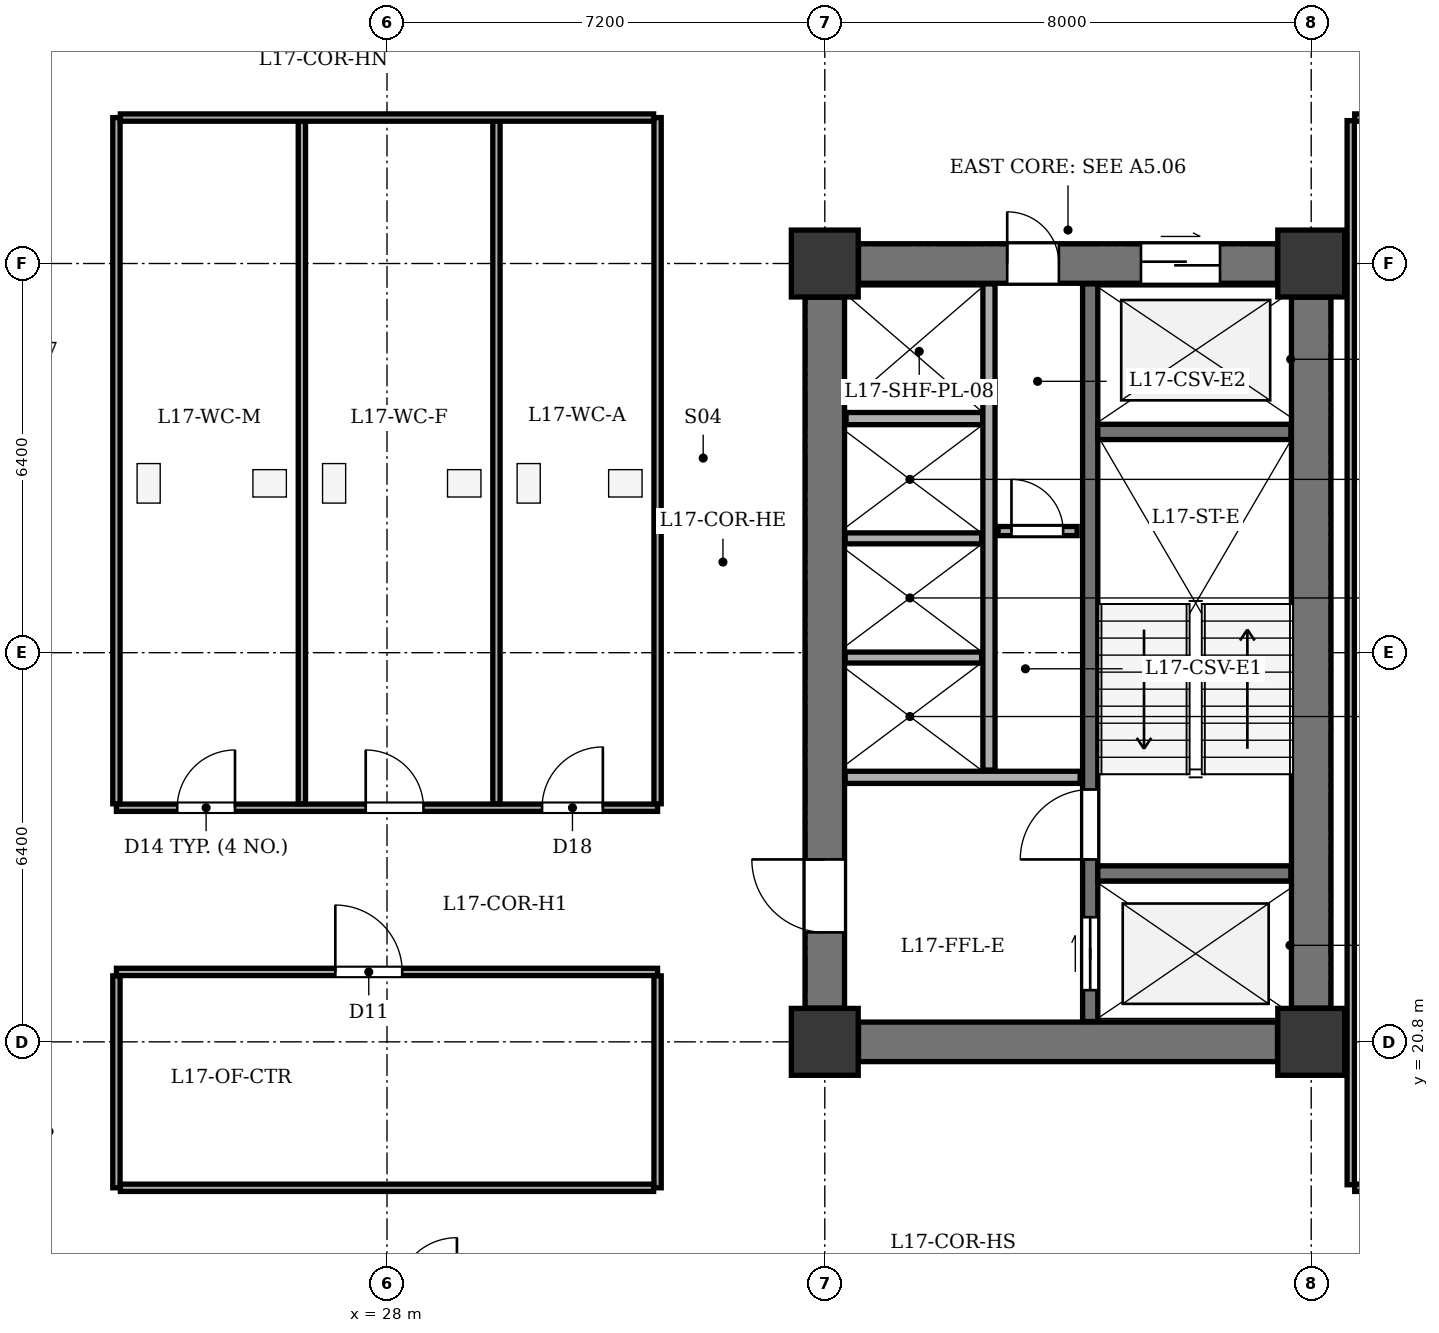
"""IFC4 building model, lengths in metres.
Left out: names, types, materials, properties, quantities, classifications, styles, units other than length and angle.
Written with IfcOpenShell. Run it as: python <this file> out.ifc"""

import sys

from ifc_helpers import new_model, si_unit, direction, frame, frame_2d, origin, origin_2d, place, context, subcontext, project, spatial, rectangle, extrude, element, fill, save


model = new_model("IFC4")
c1 = context("Model", 3, precision=1e-05, world=origin(), true_north=direction((0.0, 1.0)))
c2 = subcontext(c1, "Body", "Model", "MODEL_VIEW")
j1 = project(units=[si_unit("LENGTHUNIT", "METRE"), si_unit("PLANEANGLEUNIT", "RADIAN")], contexts=[c1])
p1 = place(None, origin())
s1 = spatial("IfcSite", under=j1, at=p1, CompositionType="ELEMENT")
p2 = place(p1, origin())
s2 = spatial("IfcBuilding", under=s1, at=p2, CompositionType="ELEMENT")
p3 = place(p2, frame((0.0, 0.0, 71.1)))
s3 = spatial("IfcBuildingStorey", under=s2, at=p3, CompositionType="ELEMENT", Elevation=71.1)
for number, where, z_axis, x_axis in (
    (1, (35.2, 20.8, 0.0), (0.0, 0.0, 1.0), (1.0, 0.0, 0.0)),
    (2, (43.2, 20.8, 0.0), (0.0, 0.0, 1.0), (1.0, 0.0, 0.0)),
    (3, (35.2, 33.6, 0.0), (0.0, 0.0, 1.0), (1.0, 0.0, 0.0)),
    (4, (43.2, 33.6, 0.0), (0.0, 0.0, 1.0), (1.0, 0.0, 0.0)),
):
    element("IfcColumn", number, at=place(p3, frame(where, z_axis=z_axis, x_axis=x_axis)), inside=s3, PredefinedType="COLUMN", context=c2, shape_type="SweptSolid", body=[
        extrude(rectangle(XDim=1.1, YDim=1.1, at=origin_2d()), origin(), (0.0, 0.0, 1.0), 3.9),
    ])
p4 = place(p3, frame((43.2, 21.355, 0.0), z_axis=(0.0, 0.0, 1.0), x_axis=(0.0, 1.0, 0.0)))
e5 = element("IfcWall", 5, at=p4, inside=s3, PredefinedType="SHEAR", context=c2, shape_type="SweptSolid", body=[
    extrude(rectangle(XDim=11.69, YDim=0.65, at=frame_2d((5.845, 0.0))), origin(), (0.0, 0.0, 1.0), 3.6),
])
p5 = place(p3, frame((35.755, 20.8, 0.0), z_axis=(0.0, 0.0, 1.0), x_axis=(1.0, 0.0, 0.0)))
e6 = element("IfcWall", 6, at=p5, inside=s3, PredefinedType="SHEAR", context=c2, shape_type="SweptSolid", body=[
    extrude(rectangle(XDim=6.89, YDim=0.65, at=frame_2d((3.445, 0.0))), origin(), (0.0, 0.0, 1.0), 3.6),
])
p6 = place(p3, frame((35.755, 33.6, 0.0), z_axis=(0.0, 0.0, 1.0), x_axis=(1.0, 0.0, 0.0)))
e7 = element("IfcWall", 7, at=p6, inside=s3, PredefinedType="SHEAR", context=c2, shape_type="SweptSolid", body=[
    extrude(rectangle(XDim=6.89, YDim=0.65, at=frame_2d((3.445, 0.0))), origin(), (0.0, 0.0, 1.0), 3.6),
])
p7 = place(p6, frame((4.645, 0.0, 0.0)))
e8 = element("IfcOpeningElement", 8, at=p7, cuts=e7, PredefinedType="OPENING", context=c2, shape_type="SweptSolid", body=[
    extrude(rectangle(XDim=1.3, YDim=2.15, at=frame_2d((0.65, 1.075))), frame((0.0, 0.335, 0.0), z_axis=(0.0, -1.0, 0.0), x_axis=(1.0, 0.0, 0.0)), (0.0, 0.0, 1.0), 0.67),
])
p8 = place(p6, frame((2.445, 0.0, 0.0)))
e9 = element("IfcOpeningElement", 9, at=p8, cuts=e7, PredefinedType="OPENING", context=c2, shape_type="SweptSolid", body=[
    extrude(rectangle(XDim=0.85, YDim=2.02, at=frame_2d((0.425, 1.01))), frame((0.0, 0.335, 0.0), z_axis=(0.0, -1.0, 0.0), x_axis=(1.0, 0.0, 0.0)), (0.0, 0.0, 1.0), 0.67),
])
p9 = place(p3, frame((35.2, 21.355, 0.0), z_axis=(0.0, 0.0, 1.0), x_axis=(0.0, 1.0, 0.0)))
e10 = element("IfcWall", 10, at=p9, inside=s3, PredefinedType="SHEAR", context=c2, shape_type="SweptSolid", body=[
    extrude(rectangle(XDim=11.69, YDim=0.65, at=frame_2d((5.845, 0.0))), origin(), (0.0, 0.0, 1.0), 3.6),
])
p10 = place(p9, frame((1.245, 0.0, 0.0)))
e11 = element("IfcOpeningElement", 11, at=p10, cuts=e10, PredefinedType="OPENING", context=c2, shape_type="SweptSolid", body=[
    extrude(rectangle(XDim=1.2, YDim=2.15, at=frame_2d((0.6, 1.075))), frame((0.0, 0.335, 0.0), z_axis=(0.0, -1.0, 0.0), x_axis=(1.0, 0.0, 0.0)), (0.0, 0.0, 1.0), 0.67),
])
p11 = place(p3, frame((39.565, 21.135, 0.0), z_axis=(0.0, 0.0, 1.0), x_axis=(0.0, 1.0, 0.0)))
e12 = element("IfcWall", 12, at=p11, inside=s3, PredefinedType="SHEAR", context=c2, shape_type="SweptSolid", body=[
    extrude(rectangle(XDim=12.13, YDim=0.25, at=frame_2d((6.065, 0.0))), origin(), (0.0, 0.0, 1.0), 3.6),
])
p12 = place(p11, frame((0.515, 0.0, 0.0)))
e13 = element("IfcOpeningElement", 13, at=p12, cuts=e12, PredefinedType="OPENING", context=c2, shape_type="SweptSolid", body=[
    extrude(rectangle(XDim=1.2, YDim=2.15, at=frame_2d((0.6, 1.075))), frame((0.0, 0.135, 0.0), z_axis=(0.0, -1.0, 0.0), x_axis=(1.0, 0.0, 0.0)), (0.0, 0.0, 1.0), 0.27),
])
p13 = place(p11, frame((2.665, 0.0, 0.0)))
e14 = element("IfcOpeningElement", 14, at=p13, cuts=e12, PredefinedType="OPENING", context=c2, shape_type="SweptSolid", body=[
    extrude(rectangle(XDim=1.15, YDim=2.15, at=frame_2d((0.575, 1.075))), frame((0.0, 0.135, 0.0), z_axis=(0.0, -1.0, 0.0), x_axis=(1.0, 0.0, 0.0)), (0.0, 0.0, 1.0), 0.27),
])
for number, where, z_axis, x_axis in (
    (15, (39.69, 23.57, 0.0), (0.0, 0.0, 1.0), (1.0, 0.0, 0.0)),
    (16, (39.69, 30.83, 0.0), (0.0, 0.0, 1.0), (1.0, 0.0, 0.0)),
):
    element("IfcWall", number, at=place(p3, frame(where, z_axis=z_axis, x_axis=x_axis)), inside=s3, PredefinedType="SHEAR", context=c2, shape_type="SweptSolid", body=[
        extrude(rectangle(XDim=3.175, YDim=0.25, at=frame_2d((1.587, 0.0))), origin(), (0.0, 0.0, 1.0), 3.6),
    ])
p14 = place(p3, frame((35.535, 25.15, 0.0), z_axis=(0.0, 0.0, 1.0), x_axis=(1.0, 0.0, 0.0)))
e17 = element("IfcWall", 17, at=p14, inside=s3, PredefinedType="SOLIDWALL", context=c2, shape_type="SweptSolid", body=[
    extrude(rectangle(XDim=3.865, YDim=0.2, at=frame_2d((1.933, 0.0))), origin(), (0.0, 0.0, 1.0), 3.6),
])
p15 = place(p3, frame((35.55, 31.05, 0.0), z_axis=(0.0, 0.0, 1.0), x_axis=(1.0, 0.0, 0.0)))
e18 = element("IfcWall", 18, at=p15, inside=s3, PredefinedType="SOLIDWALL", context=c2, shape_type="SweptSolid", body=[
    extrude(rectangle(XDim=2.25, YDim=0.2, at=frame_2d((1.125, 0.0))), origin(), (0.0, 0.0, 1.0), 3.6),
])
p16 = place(p3, frame((37.9, 25.27, 0.0), z_axis=(0.0, 0.0, 1.0), x_axis=(0.0, 1.0, 0.0)))
e19 = element("IfcWall", 19, at=p16, inside=s3, PredefinedType="SOLIDWALL", context=c2, shape_type="SweptSolid", body=[
    extrude(rectangle(XDim=7.995, YDim=0.2, at=frame_2d((3.998, 0.0))), origin(), (0.0, 0.0, 1.0), 3.6),
])
for number, where, z_axis, x_axis in (
    (20, (35.535, 27.12, 0.0), (0.0, 0.0, 1.0), (1.0, 0.0, 0.0)),
    (21, (35.535, 29.08, 0.0), (0.0, 0.0, 1.0), (1.0, 0.0, 0.0)),
):
    element("IfcWall", number, at=place(p3, frame(where, z_axis=z_axis, x_axis=x_axis)), inside=s3, PredefinedType="PARTITIONING", context=c2, shape_type="SweptSolid", body=[
        extrude(rectangle(XDim=2.245, YDim=0.18, at=frame_2d((1.123, 0.0))), origin(), (0.0, 0.0, 1.0), 3.6),
    ])
p17 = place(p3, frame((38.05, 29.2, 0.0), z_axis=(0.0, 0.0, 1.0), x_axis=(1.0, 0.0, 0.0)))
e22 = element("IfcWall", 22, at=p17, inside=s3, PredefinedType="PARTITIONING", context=c2, shape_type="SweptSolid", body=[
    extrude(rectangle(XDim=1.3, YDim=0.15, at=frame_2d((0.65, 0.0))), origin(), (0.0, 0.0, 1.0), 3.6),
])
p18 = place(p17, frame((0.22, 0.0, 0.0)))
e23 = element("IfcOpeningElement", 23, at=p18, cuts=e22, PredefinedType="OPENING", context=c2, shape_type="SweptSolid", body=[
    extrude(rectangle(XDim=0.85, YDim=2.02, at=frame_2d((0.425, 1.01))), frame((0.0, 0.085, 0.0), z_axis=(0.0, -1.0, 0.0), x_axis=(1.0, 0.0, 0.0)), (0.0, 0.0, 1.0), 0.17),
])
p19 = place(p3, frame((23.55, 24.65, 0.0), z_axis=(0.0, 0.0, 1.0), x_axis=(1.0, 0.0, 0.0)))
e24 = element("IfcWall", 24, at=p19, inside=s3, PredefinedType="PARTITIONING", context=c2, shape_type="SweptSolid", body=[
    extrude(rectangle(XDim=8.9, YDim=0.12, at=frame_2d((4.45, 0.0))), origin(), (0.0, 0.0, 1.0), 3.135),
])
p20 = place(p19, frame((1.0, 0.0, 0.0)))
e25 = element("IfcOpeningElement", 25, at=p20, cuts=e24, PredefinedType="OPENING", context=c2, shape_type="SweptSolid", body=[
    extrude(rectangle(XDim=0.95, YDim=2.1, at=frame_2d((0.475, 1.05))), frame((0.0, 0.07, 0.0), z_axis=(0.0, -1.0, 0.0), x_axis=(1.0, 0.0, 0.0)), (0.0, 0.0, 1.0), 0.14),
])
p21 = place(p19, frame((4.1, 0.0, 0.0)))
e26 = element("IfcOpeningElement", 26, at=p21, cuts=e24, PredefinedType="OPENING", context=c2, shape_type="SweptSolid", body=[
    extrude(rectangle(XDim=0.95, YDim=2.1, at=frame_2d((0.475, 1.05))), frame((0.0, 0.07, 0.0), z_axis=(0.0, -1.0, 0.0), x_axis=(1.0, 0.0, 0.0)), (0.0, 0.0, 1.0), 0.14),
])
p22 = place(p19, frame((7.0, 0.0, 0.0)))
e27 = element("IfcOpeningElement", 27, at=p22, cuts=e24, PredefinedType="OPENING", context=c2, shape_type="SweptSolid", body=[
    extrude(rectangle(XDim=1.0, YDim=2.1, at=frame_2d((0.5, 1.05))), frame((0.0, 0.07, 0.0), z_axis=(0.0, -1.0, 0.0), x_axis=(1.0, 0.0, 0.0)), (0.0, 0.0, 1.0), 0.14),
])
for number, where, z_axis, x_axis in (
    (28, (23.55, 24.715, 0.0), (0.0, 0.0, 1.0), (0.0, 1.0, 0.0)),
    (29, (32.45, 24.715, 0.0), (0.0, 0.0, 1.0), (0.0, 1.0, 0.0)),
    (30, (26.6, 24.715, 0.0), (0.0, 0.0, 1.0), (0.0, 1.0, 0.0)),
):
    element("IfcWall", number, at=place(p3, frame(where, z_axis=z_axis, x_axis=x_axis)), inside=s3, PredefinedType="PARTITIONING", context=c2, shape_type="SweptSolid", body=[
        extrude(rectangle(XDim=11.285, YDim=0.12, at=frame_2d((5.643, 0.0))), origin(), (0.0, 0.0, 1.0), 3.6),
    ])
p23 = place(p3, frame((29.8, 24.715, 0.0), z_axis=(0.0, 0.0, 1.0), x_axis=(0.0, 1.0, 0.0)))
e31 = element("IfcWall", 31, at=p23, inside=s3, PredefinedType="PARTITIONING", context=c2, shape_type="SweptSolid", body=[
    extrude(rectangle(XDim=11.285, YDim=0.12, at=frame_2d((5.643, 0.0))), origin(), (0.0, 0.0, 1.0), 3.135),
])
p24 = place(p3, frame((23.615, 36.0, 0.0), z_axis=(0.0, 0.0, 1.0), x_axis=(1.0, 0.0, 0.0)))
e32 = element("IfcWall", 32, at=p24, inside=s3, PredefinedType="PARTITIONING", context=c2, shape_type="SweptSolid", body=[
    extrude(rectangle(XDim=8.77, YDim=0.12, at=frame_2d((4.385, 0.0))), origin(), (0.0, 0.0, 1.0), 3.6),
])
p25 = place(p3, frame((23.55, 21.95, 0.0), z_axis=(0.0, 0.0, 1.0), x_axis=(1.0, 0.0, 0.0)))
e33 = element("IfcWall", 33, at=p25, inside=s3, PredefinedType="PARTITIONING", context=c2, shape_type="SweptSolid", body=[
    extrude(rectangle(XDim=8.9, YDim=0.12, at=frame_2d((4.45, 0.0))), origin(), (0.0, 0.0, 1.0), 3.135),
])
p26 = place(p25, frame((3.6, 0.0, 0.0)))
e34 = element("IfcOpeningElement", 34, at=p26, cuts=e33, PredefinedType="OPENING", context=c2, shape_type="SweptSolid", body=[
    extrude(rectangle(XDim=1.1, YDim=2.15, at=frame_2d((0.55, 1.075))), frame((0.0, 0.07, 0.0), z_axis=(0.0, -1.0, 0.0), x_axis=(1.0, 0.0, 0.0)), (0.0, 0.0, 1.0), 0.14),
])
for number, where, z_axis, x_axis in (
    (35, (23.55, 18.4, 0.0), (0.0, 0.0, 1.0), (0.0, 1.0, 0.0)),
    (36, (32.45, 18.4, 0.0), (0.0, 0.0, 1.0), (0.0, 1.0, 0.0)),
):
    element("IfcWall", number, at=place(p3, frame(where, z_axis=z_axis, x_axis=x_axis)), inside=s3, PredefinedType="PARTITIONING", context=c2, shape_type="SweptSolid", body=[
        extrude(rectangle(XDim=3.485, YDim=0.12, at=frame_2d((1.743, 0.0))), origin(), (0.0, 0.0, 1.0), 3.6),
    ])
p27 = place(p3, frame((23.615, 18.4, 0.0), z_axis=(0.0, 0.0, 1.0), x_axis=(1.0, 0.0, 0.0)))
e37 = element("IfcWall", 37, at=p27, inside=s3, PredefinedType="PARTITIONING", context=c2, shape_type="SweptSolid", body=[
    extrude(rectangle(XDim=8.77, YDim=0.12, at=frame_2d((4.385, 0.0))), origin(), (0.0, 0.0, 1.0), 3.6),
])
p28 = place(p3, frame((43.85, 18.45, 0.0), z_axis=(0.0, 0.0, 1.0), x_axis=(0.0, 1.0, 0.0)))
e38 = element("IfcWall", 38, at=p28, inside=s3, PredefinedType="PARTITIONING", context=c2, shape_type="SweptSolid", body=[
    extrude(rectangle(XDim=17.5, YDim=0.12, at=frame_2d((8.75, 0.0))), origin(), (0.0, 0.0, 1.0), 3.6),
])
p29 = place(p3, frame((43.915, 18.4, 0.0), z_axis=(0.0, 0.0, 1.0), x_axis=(1.0, 0.0, 0.0)))
e39 = element("IfcWall", 39, at=p29, inside=s3, PredefinedType="PARTITIONING", context=c2, shape_type="SweptSolid", body=[
    extrude(rectangle(XDim=11.38, YDim=0.12, at=frame_2d((5.69, 0.0))), origin(), (0.0, 0.0, 1.0), 3.6),
])
p30 = place(p29, frame((1.485, 0.0, 0.0)))
e40 = element("IfcOpeningElement", 40, at=p30, cuts=e39, PredefinedType="OPENING", context=c2, shape_type="SweptSolid", body=[
    extrude(rectangle(XDim=0.95, YDim=2.1, at=frame_2d((0.475, 1.05))), frame((0.0, 0.07, 0.0), z_axis=(0.0, -1.0, 0.0), x_axis=(1.0, 0.0, 0.0)), (0.0, 0.0, 1.0), 0.14),
])
p31 = place(p3, frame((43.915, 36.0, 0.0), z_axis=(0.0, 0.0, 1.0), x_axis=(1.0, 0.0, 0.0)))
e41 = element("IfcWall", 41, at=p31, inside=s3, PredefinedType="PARTITIONING", context=c2, shape_type="SweptSolid", body=[
    extrude(rectangle(XDim=11.38, YDim=0.12, at=frame_2d((5.69, 0.0))), origin(), (0.0, 0.0, 1.0), 3.6),
])
p32 = place(p31, frame((1.485, 0.0, 0.0)))
e42 = element("IfcOpeningElement", 42, at=p32, cuts=e41, PredefinedType="OPENING", context=c2, shape_type="SweptSolid", body=[
    extrude(rectangle(XDim=0.95, YDim=2.1, at=frame_2d((0.475, 1.05))), frame((0.0, 0.07, 0.0), z_axis=(0.0, -1.0, 0.0), x_axis=(1.0, 0.0, 0.0)), (0.0, 0.0, 1.0), 0.14),
])
p33 = place(p7, origin())
e43 = element("IfcDoor", 43, at=p33, inside=s3, OperationType="DOUBLE_DOOR_SLIDING", PredefinedType="DOOR", context=c2, shape_type="SweptSolid", body=[
    extrude(rectangle(XDim=1.3, YDim=2.15, at=frame_2d((0.65, 1.075))), frame((0.0, 0.025, 0.0), z_axis=(0.0, -1.0, 0.0), x_axis=(1.0, 0.0, 0.0)), (0.0, 0.0, 1.0), 0.05),
])
fill(e8, e43)
p34 = place(p8, origin())
e44 = element("IfcDoor", 44, at=p34, inside=s3, OperationType="SINGLE_SWING_LEFT", PredefinedType="DOOR", context=c2, shape_type="SweptSolid", body=[
    extrude(rectangle(XDim=0.85, YDim=2.02, at=frame_2d((0.425, 1.01))), frame((0.0, 0.025, 0.0), z_axis=(0.0, -1.0, 0.0), x_axis=(1.0, 0.0, 0.0)), (0.0, 0.0, 1.0), 0.05),
])
fill(e9, e44)
p35 = place(p10, origin())
e45 = element("IfcDoor", 45, at=p35, inside=s3, OperationType="SINGLE_SWING_RIGHT", PredefinedType="DOOR", context=c2, shape_type="SweptSolid", body=[
    extrude(rectangle(XDim=1.2, YDim=2.15, at=frame_2d((0.6, 1.075))), frame((0.0, 0.025, 0.0), z_axis=(0.0, -1.0, 0.0), x_axis=(1.0, 0.0, 0.0)), (0.0, 0.0, 1.0), 0.05),
])
fill(e11, e45)
p36 = place(p12, origin())
e46 = element("IfcDoor", 46, at=p36, inside=s3, OperationType="DOUBLE_DOOR_SLIDING", PredefinedType="DOOR", context=c2, shape_type="SweptSolid", body=[
    extrude(rectangle(XDim=1.2, YDim=2.15, at=frame_2d((0.6, 1.075))), frame((0.0, 0.025, 0.0), z_axis=(0.0, -1.0, 0.0), x_axis=(1.0, 0.0, 0.0)), (0.0, 0.0, 1.0), 0.05),
])
fill(e13, e46)
p37 = place(p13, origin())
e47 = element("IfcDoor", 47, at=p37, inside=s3, OperationType="SINGLE_SWING_LEFT", PredefinedType="DOOR", context=c2, shape_type="SweptSolid", body=[
    extrude(rectangle(XDim=1.15, YDim=2.15, at=frame_2d((0.575, 1.075))), frame((0.0, 0.025, 0.0), z_axis=(0.0, -1.0, 0.0), x_axis=(1.0, 0.0, 0.0)), (0.0, 0.0, 1.0), 0.05),
])
fill(e14, e47)
p38 = place(p18, origin())
e48 = element("IfcDoor", 48, at=p38, inside=s3, OperationType="SINGLE_SWING_LEFT", PredefinedType="DOOR", context=c2, shape_type="SweptSolid", body=[
    extrude(rectangle(XDim=0.85, YDim=2.02, at=frame_2d((0.425, 1.01))), frame((0.0, 0.025, 0.0), z_axis=(0.0, -1.0, 0.0), x_axis=(1.0, 0.0, 0.0)), (0.0, 0.0, 1.0), 0.05),
])
fill(e23, e48)
p39 = place(p20, origin())
e49 = element("IfcDoor", 49, at=p39, inside=s3, OperationType="SINGLE_SWING_RIGHT", PredefinedType="DOOR", context=c2, shape_type="SweptSolid", body=[
    extrude(rectangle(XDim=0.95, YDim=2.1, at=frame_2d((0.475, 1.05))), frame((0.0, 0.025, 0.0), z_axis=(0.0, -1.0, 0.0), x_axis=(1.0, 0.0, 0.0)), (0.0, 0.0, 1.0), 0.05),
])
fill(e25, e49)
p40 = place(p21, origin())
e50 = element("IfcDoor", 50, at=p40, inside=s3, OperationType="SINGLE_SWING_LEFT", PredefinedType="DOOR", context=c2, shape_type="SweptSolid", body=[
    extrude(rectangle(XDim=0.95, YDim=2.1, at=frame_2d((0.475, 1.05))), frame((0.0, 0.025, 0.0), z_axis=(0.0, -1.0, 0.0), x_axis=(1.0, 0.0, 0.0)), (0.0, 0.0, 1.0), 0.05),
])
fill(e26, e50)
p41 = place(p22, origin())
e51 = element("IfcDoor", 51, at=p41, inside=s3, OperationType="SINGLE_SWING_RIGHT", PredefinedType="DOOR", context=c2, shape_type="SweptSolid", body=[
    extrude(rectangle(XDim=1.0, YDim=2.1, at=frame_2d((0.5, 1.05))), frame((0.0, 0.025, 0.0), z_axis=(0.0, -1.0, 0.0), x_axis=(1.0, 0.0, 0.0)), (0.0, 0.0, 1.0), 0.05),
])
fill(e27, e51)
p42 = place(p26, origin())
e52 = element("IfcDoor", 52, at=p42, inside=s3, OperationType="SINGLE_SWING_LEFT", PredefinedType="DOOR", context=c2, shape_type="SweptSolid", body=[
    extrude(rectangle(XDim=1.1, YDim=2.15, at=frame_2d((0.55, 1.075))), frame((0.0, 0.025, 0.0), z_axis=(0.0, -1.0, 0.0), x_axis=(1.0, 0.0, 0.0)), (0.0, 0.0, 1.0), 0.05),
])
fill(e34, e52)
save(model, sys.argv[1])
